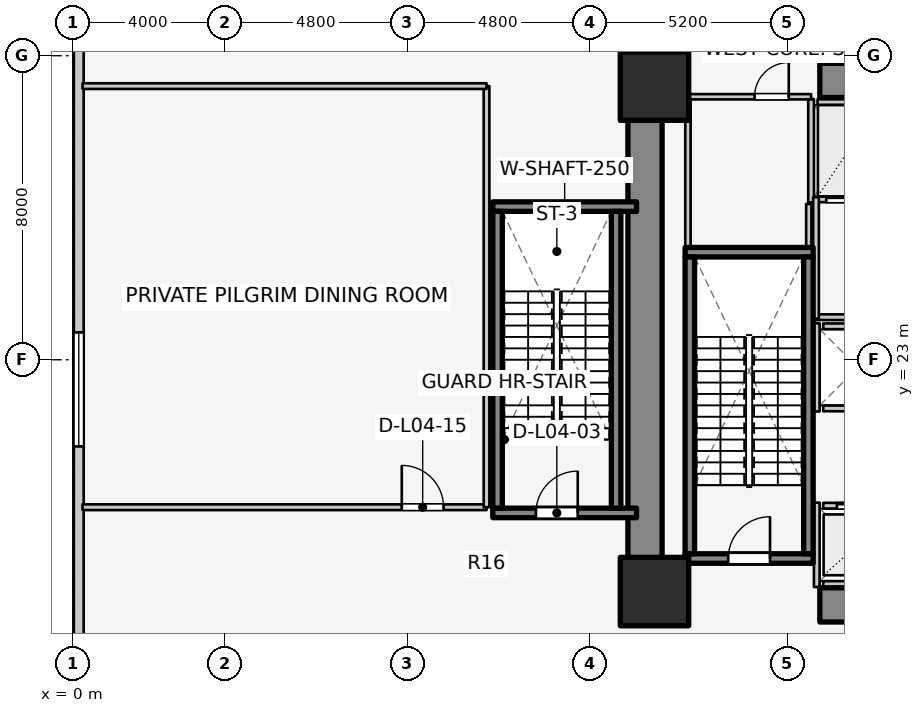
"""IFC4 building model, lengths in metres.
Left out: names, types, materials, properties, quantities, classifications, styles, units other than length and angle.
Written with IfcOpenShell. Run it as: python <this file> out.ifc"""

import sys

from ifc_helpers import new_model, si_unit, direction, frame, frame_2d, origin, origin_2d, place, context, subcontext, project, spatial, rectangle, extrude, element, fill, save


model = new_model("IFC4")
c1 = context("Model", 3, precision=1e-05, world=origin(), true_north=direction((0.0, 1.0)))
c2 = subcontext(c1, "Body", "Model", "MODEL_VIEW")
j1 = project(units=[si_unit("LENGTHUNIT", "METRE"), si_unit("PLANEANGLEUNIT", "RADIAN")], contexts=[c1])
p1 = place(None, origin())
s1 = spatial("IfcSite", under=j1, at=p1, CompositionType="ELEMENT")
p2 = place(p1, origin())
s2 = spatial("IfcBuilding", under=s1, at=p2, CompositionType="ELEMENT")
p3 = place(p2, frame((0.0, 0.0, 13.8)))
s3 = spatial("IfcBuildingStorey", under=s2, at=p3, CompositionType="ELEMENT", Elevation=13.8)
p4 = place(p3, frame((15.05, 17.05, 0.0), z_axis=(0.0, 0.0, 1.0), x_axis=(0.0, 1.0, 0.0)))
e1 = element("IfcWall", 1, at=p4, inside=s3, PredefinedType="SHEAR", context=c2, shape_type="SweptSolid", body=[
    extrude(rectangle(XDim=12.8, YDim=0.9, at=frame_2d((6.4, 0.0))), origin(), (0.0, 0.0, 1.0), 4.6),
])
for number, where, z_axis, x_axis in (
    (2, (19.65, 16.55, 0.0), (0.0, 0.0, 1.0), (1.0, 0.0, 0.0)),
    (3, (19.65, 30.35, 0.0), (0.0, 0.0, 1.0), (1.0, 0.0, 0.0)),
):
    element("IfcWall", number, at=place(p3, frame(where, z_axis=z_axis, x_axis=x_axis)), inside=s3, PredefinedType="SHEAR", context=c2, shape_type="SweptSolid", body=[
        extrude(rectangle(XDim=4.5, YDim=0.9, at=frame_2d((2.25, 0.0))), origin(), (0.0, 0.0, 1.0), 4.6),
    ])
p5 = place(p3, frame((16.105, 17.77, 0.0), z_axis=(0.0, 0.0, 1.0), x_axis=(1.0, 0.0, 0.0)))
e4 = element("IfcWall", 4, at=p5, inside=s3, PredefinedType="SOLIDWALL", context=c2, shape_type="SweptSolid", body=[
    extrude(rectangle(XDim=3.37, YDim=0.25, at=frame_2d((1.685, 0.0))), origin(), (0.0, 0.0, 1.0), 4.6),
])
p6 = place(p5, frame((1.135, 0.0, 0.0)))
e5 = element("IfcOpeningElement", 5, at=p6, cuts=e4, PredefinedType="OPENING", context=c2, shape_type="SweptSolid", body=[
    extrude(rectangle(XDim=1.1, YDim=2.1, at=frame_2d((0.55, 1.05))), frame((0.0, 0.135, 0.0), z_axis=(0.0, -1.0, 0.0), x_axis=(1.0, 0.0, 0.0)), (0.0, 0.0, 1.0), 0.27),
])
p7 = place(p3, frame((16.105, 25.83, 0.0), z_axis=(0.0, 0.0, 1.0), x_axis=(1.0, 0.0, 0.0)))
e6 = element("IfcWall", 6, at=p7, inside=s3, PredefinedType="SOLIDWALL", context=c2, shape_type="SweptSolid", body=[
    extrude(rectangle(XDim=3.37, YDim=0.25, at=frame_2d((1.685, 0.0))), origin(), (0.0, 0.0, 1.0), 4.6),
])
for number, where, z_axis, x_axis in (
    (7, (16.23, 17.895, 0.0), (0.0, 0.0, 1.0), (0.0, 1.0, 0.0)),
    (8, (19.35, 17.895, 0.0), (0.0, 0.0, 1.0), (0.0, 1.0, 0.0)),
):
    element("IfcWall", number, at=place(p3, frame(where, z_axis=z_axis, x_axis=x_axis)), inside=s3, PredefinedType="SOLIDWALL", context=c2, shape_type="SweptSolid", body=[
        extrude(rectangle(XDim=7.81, YDim=0.25, at=frame_2d((3.905, 0.0))), origin(), (0.0, 0.0, 1.0), 4.6),
    ])
p8 = place(p3, frame((11.045, 18.97, 0.0), z_axis=(0.0, 0.0, 1.0), x_axis=(1.0, 0.0, 0.0)))
e9 = element("IfcWall", 9, at=p8, inside=s3, PredefinedType="SOLIDWALL", context=c2, shape_type="SweptSolid", body=[
    extrude(rectangle(XDim=3.782, YDim=0.25, at=frame_2d((1.891, 0.0))), origin(), (0.0, 0.0, 1.0), 4.6),
])
p9 = place(p8, frame((1.135, 0.0, 0.0)))
e10 = element("IfcOpeningElement", 10, at=p9, cuts=e9, PredefinedType="OPENING", context=c2, shape_type="SweptSolid", body=[
    extrude(rectangle(XDim=1.1, YDim=2.1, at=frame_2d((0.55, 1.05))), frame((0.0, 0.135, 0.0), z_axis=(0.0, -1.0, 0.0), x_axis=(1.0, 0.0, 0.0)), (0.0, 0.0, 1.0), 0.27),
])
p10 = place(p3, frame((11.045, 27.03, 0.0), z_axis=(0.0, 0.0, 1.0), x_axis=(1.0, 0.0, 0.0)))
e11 = element("IfcWall", 11, at=p10, inside=s3, PredefinedType="SOLIDWALL", context=c2, shape_type="SweptSolid", body=[
    extrude(rectangle(XDim=3.782, YDim=0.25, at=frame_2d((1.891, 0.0))), origin(), (0.0, 0.0, 1.0), 4.6),
])
for number, where, z_axis, x_axis in (
    (12, (11.17, 19.095, 0.0), (0.0, 0.0, 1.0), (0.0, 1.0, 0.0)),
    (13, (14.29, 19.095, 0.0), (0.0, 0.0, 1.0), (0.0, 1.0, 0.0)),
):
    element("IfcWall", number, at=place(p3, frame(where, z_axis=z_axis, x_axis=x_axis)), inside=s3, PredefinedType="SOLIDWALL", context=c2, shape_type="SweptSolid", body=[
        extrude(rectangle(XDim=7.81, YDim=0.25, at=frame_2d((3.905, 0.0))), origin(), (0.0, 0.0, 1.0), 4.6),
    ])
for number, where, z_axis, x_axis in (
    (14, (15.3, 16.9, 0.0), (0.0, 0.0, 1.0), (1.0, 0.0, 0.0)),
    (15, (15.3, 30.2, 0.0), (0.0, 0.0, 1.0), (1.0, 0.0, 0.0)),
):
    element("IfcColumn", number, at=place(p3, frame(where, z_axis=z_axis, x_axis=x_axis)), inside=s3, PredefinedType="COLUMN", context=c2, shape_type="SweptSolid", body=[
        extrude(rectangle(XDim=1.8, YDim=1.8, at=origin_2d()), origin(), (0.0, 0.0, 1.0), 4.6),
    ])
p11 = place(p3, frame((0.15, 45.72, 0.0), z_axis=(0.0, 0.0, 1.0), x_axis=(0.0, -1.0, 0.0)))
e16 = element("IfcWall", 16, at=p11, inside=s3, PredefinedType="STANDARD", context=c2, shape_type="SweptSolid", body=[
    extrude(rectangle(XDim=45.44, YDim=0.26, at=frame_2d((22.72, 0.0))), origin(), (0.0, 0.0, 1.0), 4.28),
])
p12 = place(p11, frame((6.0, 0.0, 0.9)))
e17 = element("IfcOpeningElement", 17, at=p12, cuts=e16, PredefinedType="OPENING", context=c2, shape_type="SweptSolid", body=[
    extrude(rectangle(XDim=3.0, YDim=2.4, at=frame_2d((1.5, 1.2))), frame((0.0, 0.14, 0.0), z_axis=(0.0, -1.0, 0.0), x_axis=(1.0, 0.0, 0.0)), (0.0, 0.0, 1.0), 0.28),
])
p13 = place(p11, frame((22.0, 0.0, 0.9)))
e18 = element("IfcOpeningElement", 18, at=p13, cuts=e16, PredefinedType="OPENING", context=c2, shape_type="SweptSolid", body=[
    extrude(rectangle(XDim=3.0, YDim=2.4, at=frame_2d((1.5, 1.2))), frame((0.0, 0.14, 0.0), z_axis=(0.0, -1.0, 0.0), x_axis=(1.0, 0.0, 0.0)), (0.0, 0.0, 1.0), 0.28),
])
p14 = place(p11, frame((38.0, 0.0, 0.9)))
e19 = element("IfcOpeningElement", 19, at=p14, cuts=e16, PredefinedType="OPENING", context=c2, shape_type="SweptSolid", body=[
    extrude(rectangle(XDim=3.0, YDim=2.4, at=frame_2d((1.5, 1.2))), frame((0.0, 0.14, 0.0), z_axis=(0.0, -1.0, 0.0), x_axis=(1.0, 0.0, 0.0)), (0.0, 0.0, 1.0), 0.28),
])
p15 = place(p3, frame((19.74, 19.16, 0.0), z_axis=(0.0, 0.0, 1.0), x_axis=(1.0, 0.0, 0.0)))
e20 = element("IfcWall", 20, at=p15, inside=s3, PredefinedType="SOLIDWALL", context=c2, shape_type="SweptSolid", body=[
    extrude(rectangle(XDim=1.82, YDim=0.15, at=frame_2d((0.91, 0.0))), origin(), (0.0, 0.0, 1.0), 4.255),
])
p16 = place(p15, frame((0.36, 0.0, 0.0)))
e21 = element("IfcOpeningElement", 21, at=p16, cuts=e20, PredefinedType="OPENING", context=c2, shape_type="SweptSolid", body=[
    extrude(rectangle(XDim=1.1, YDim=2.1, at=frame_2d((0.55, 1.05))), frame((0.0, 0.085, 0.0), z_axis=(0.0, -1.0, 0.0), x_axis=(1.0, 0.0, 0.0)), (0.0, 0.0, 1.0), 0.17),
])
p17 = place(p3, frame((19.74, 17.1, 0.0), z_axis=(0.0, 0.0, 1.0), x_axis=(1.0, 0.0, 0.0)))
e22 = element("IfcWall", 22, at=p17, inside=s3, PredefinedType="SOLIDWALL", context=c2, shape_type="SweptSolid", body=[
    extrude(rectangle(XDim=1.82, YDim=0.15, at=frame_2d((0.91, 0.0))), origin(), (0.0, 0.0, 1.0), 4.255),
])
p18 = place(p3, frame((19.57, 17.02, 0.0), z_axis=(0.0, 0.0, 1.0), x_axis=(0.0, 1.0, 0.0)))
e23 = element("IfcWall", 23, at=p18, inside=s3, PredefinedType="SOLIDWALL", context=c2, shape_type="SweptSolid", body=[
    extrude(rectangle(XDim=2.22, YDim=0.15, at=frame_2d((1.11, 0.0))), origin(), (0.0, 0.0, 1.0), 3.62),
])
for number, where, z_axis, x_axis in (
    (24, (19.74, 21.72, 0.0), (0.0, 0.0, 1.0), (1.0, 0.0, 0.0)),
    (25, (19.74, 23.88, 0.0), (0.0, 0.0, 1.0), (1.0, 0.0, 0.0)),
):
    element("IfcWall", number, at=place(p3, frame(where, z_axis=z_axis, x_axis=x_axis)), inside=s3, PredefinedType="SOLIDWALL", context=c2, shape_type="SweptSolid", body=[
        extrude(rectangle(XDim=1.82, YDim=0.15, at=frame_2d((0.91, 0.0))), origin(), (0.0, 0.0, 1.0), 4.255),
    ])
p19 = place(p3, frame((19.57, 21.64, 0.0), z_axis=(0.0, 0.0, 1.0), x_axis=(0.0, 1.0, 0.0)))
e26 = element("IfcWall", 26, at=p19, inside=s3, PredefinedType="SOLIDWALL", context=c2, shape_type="SweptSolid", body=[
    extrude(rectangle(XDim=2.32, YDim=0.15, at=frame_2d((1.16, 0.0))), origin(), (0.0, 0.0, 1.0), 4.255),
])
p20 = place(p3, frame((19.59, 27.22, 0.0), z_axis=(0.0, 0.0, 1.0), x_axis=(1.0, 0.0, 0.0)))
e27 = element("IfcWall", 27, at=p20, inside=s3, PredefinedType="SOLIDWALL", context=c2, shape_type="SweptSolid", body=[
    extrude(rectangle(XDim=1.76, YDim=0.15, at=frame_2d((0.88, 0.0))), origin(), (0.0, 0.0, 1.0), 4.255),
])
p21 = place(p20, frame((0.23, 0.0, 0.0)))
e28 = element("IfcOpeningElement", 28, at=p21, cuts=e27, PredefinedType="OPENING", context=c2, shape_type="SweptSolid", body=[
    extrude(rectangle(XDim=1.3, YDim=2.1, at=frame_2d((0.65, 1.05))), frame((0.0, 0.085, 0.0), z_axis=(0.0, -1.0, 0.0), x_axis=(1.0, 0.0, 0.0)), (0.0, 0.0, 1.0), 0.17),
])
p22 = place(p3, frame((19.59, 29.78, 0.0), z_axis=(0.0, 0.0, 1.0), x_axis=(1.0, 0.0, 0.0)))
e29 = element("IfcWall", 29, at=p22, inside=s3, PredefinedType="SOLIDWALL", context=c2, shape_type="SweptSolid", body=[
    extrude(rectangle(XDim=1.76, YDim=0.15, at=frame_2d((0.88, 0.0))), origin(), (0.0, 0.0, 1.0), 4.255),
])
p23 = place(p3, frame((19.42, 27.14, 0.0), z_axis=(0.0, 0.0, 1.0), x_axis=(0.0, 1.0, 0.0)))
e30 = element("IfcWall", 30, at=p23, inside=s3, PredefinedType="SOLIDWALL", context=c2, shape_type="SweptSolid", body=[
    extrude(rectangle(XDim=2.72, YDim=0.15, at=frame_2d((1.36, 0.0))), origin(), (0.0, 0.0, 1.0), 4.255),
])
p24 = place(p3, frame((19.52, 24.12, 0.0), z_axis=(0.0, 0.0, 1.0), x_axis=(1.0, 0.0, 0.0)))
e31 = element("IfcWall", 31, at=p24, inside=s3, PredefinedType="PARTITIONING", context=c2, shape_type="SweptSolid", body=[
    extrude(rectangle(XDim=5.08, YDim=0.15, at=frame_2d((2.54, 0.0))), origin(), (0.0, 0.0, 1.0), 3.62),
])
p25 = place(p3, frame((19.55, 24.08, 0.0), z_axis=(0.0, 0.0, 1.0), x_axis=(0.0, 1.0, 0.0)))
e32 = element("IfcWall", 32, at=p25, inside=s3, PredefinedType="PARTITIONING", context=c2, shape_type="SweptSolid", body=[
    extrude(rectangle(XDim=3.2, YDim=0.15, at=frame_2d((1.6, 0.0))), origin(), (0.0, 0.0, 1.0), 4.255),
])
p26 = place(p3, frame((0.25, 19.12, 0.0), z_axis=(0.0, 0.0, 1.0), x_axis=(1.0, 0.0, 0.0)))
e33 = element("IfcWall", 33, at=p26, inside=s3, PredefinedType="PARTITIONING", context=c2, shape_type="SweptSolid", body=[
    extrude(rectangle(XDim=10.63, YDim=0.15, at=frame_2d((5.315, 0.0))), origin(), (0.0, 0.0, 1.0), 3.3),
])
p27 = place(p26, frame((8.4, 0.0, 0.0)))
e34 = element("IfcOpeningElement", 34, at=p27, cuts=e33, PredefinedType="OPENING", context=c2, shape_type="SweptSolid", body=[
    extrude(rectangle(XDim=1.1, YDim=2.1, at=frame_2d((0.55, 1.05))), frame((0.0, 0.085, 0.0), z_axis=(0.0, -1.0, 0.0), x_axis=(1.0, 0.0, 0.0)), (0.0, 0.0, 1.0), 0.17),
])
p28 = place(p3, frame((10.88, 19.12, 0.0), z_axis=(0.0, 0.0, 1.0), x_axis=(0.0, 1.0, 0.0)))
e35 = element("IfcWall", 35, at=p28, inside=s3, PredefinedType="PARTITIONING", context=c2, shape_type="SweptSolid", body=[
    extrude(rectangle(XDim=11.08, YDim=0.15, at=frame_2d((5.54, 0.0))), origin(), (0.0, 0.0, 1.0), 3.62),
])
p29 = place(p3, frame((0.25, 30.2, 0.0), z_axis=(0.0, 0.0, 1.0), x_axis=(1.0, 0.0, 0.0)))
e36 = element("IfcWall", 36, at=p29, inside=s3, PredefinedType="PARTITIONING", context=c2, shape_type="SweptSolid", body=[
    extrude(rectangle(XDim=10.63, YDim=0.15, at=frame_2d((5.315, 0.0))), origin(), (0.0, 0.0, 1.0), 3.3),
])
p30 = place(p3, frame((16.12, 29.92, 0.0), z_axis=(0.0, 0.0, 1.0), x_axis=(1.0, 0.0, 0.0)))
e37 = element("IfcWall", 37, at=p30, inside=s3, PredefinedType="PLUMBINGWALL", context=c2, shape_type="SweptSolid", body=[
    extrude(rectangle(XDim=3.3, YDim=0.14, at=frame_2d((1.65, 0.0))), origin(), (0.0, 0.0, 1.0), 4.255),
])
p31 = place(p30, frame((1.813, 0.0, 0.0)))
e38 = element("IfcOpeningElement", 38, at=p31, cuts=e37, PredefinedType="OPENING", context=c2, shape_type="SweptSolid", body=[
    extrude(rectangle(XDim=0.9, YDim=2.1, at=frame_2d((0.45, 1.05))), frame((0.0, 0.08, 0.0), z_axis=(0.0, -1.0, 0.0), x_axis=(1.0, 0.0, 0.0)), (0.0, 0.0, 1.0), 0.16),
])
p32 = place(p3, frame((16.18, 25.98, 0.0), z_axis=(0.0, 0.0, 1.0), x_axis=(0.0, 1.0, 0.0)))
e39 = element("IfcWall", 39, at=p32, inside=s3, PredefinedType="PLUMBINGWALL", context=c2, shape_type="SweptSolid", body=[
    extrude(rectangle(XDim=3.88, YDim=0.14, at=frame_2d((1.94, 0.0))), origin(), (0.0, 0.0, 1.0), 4.255),
])
p33 = place(p3, frame((19.36, 25.98, 0.0), z_axis=(0.0, 0.0, 1.0), x_axis=(0.0, 1.0, 0.0)))
e40 = element("IfcWall", 40, at=p33, inside=s3, PredefinedType="PLUMBINGWALL", context=c2, shape_type="SweptSolid", body=[
    extrude(rectangle(XDim=1.12, YDim=0.14, at=frame_2d((0.56, 0.0))), origin(), (0.0, 0.0, 1.0), 4.255),
])
p34 = place(p13, origin())
e41 = element("IfcWindow", 41, at=p34, inside=s3, PartitioningType="SINGLE_PANEL", PredefinedType="WINDOW", context=c2, shape_type="SweptSolid", body=[
    extrude(rectangle(XDim=3.0, YDim=2.4, at=frame_2d((1.5, 1.2))), frame((0.0, 0.03, 0.0), z_axis=(0.0, -1.0, 0.0), x_axis=(1.0, 0.0, 0.0)), (0.0, 0.0, 1.0), 0.06),
])
fill(e18, e41)
p35 = place(p6, origin())
e42 = element("IfcDoor", 42, at=p35, inside=s3, OperationType="SINGLE_SWING_RIGHT", PredefinedType="DOOR", context=c2, shape_type="SweptSolid", body=[
    extrude(rectangle(XDim=1.1, YDim=2.1, at=frame_2d((0.55, 1.05))), frame((0.0, 0.025, 0.0), z_axis=(0.0, -1.0, 0.0), x_axis=(1.0, 0.0, 0.0)), (0.0, 0.0, 1.0), 0.05),
])
fill(e5, e42)
p36 = place(p9, origin())
e43 = element("IfcDoor", 43, at=p36, inside=s3, OperationType="SINGLE_SWING_RIGHT", PredefinedType="DOOR", context=c2, shape_type="SweptSolid", body=[
    extrude(rectangle(XDim=1.1, YDim=2.1, at=frame_2d((0.55, 1.05))), frame((0.0, 0.025, 0.0), z_axis=(0.0, -1.0, 0.0), x_axis=(1.0, 0.0, 0.0)), (0.0, 0.0, 1.0), 0.05),
])
fill(e10, e43)
p37 = place(p16, origin())
e44 = element("IfcDoor", 44, at=p37, inside=s3, OperationType="DOUBLE_DOOR_SLIDING", PredefinedType="DOOR", context=c2, shape_type="SweptSolid", body=[
    extrude(rectangle(XDim=1.1, YDim=2.1, at=frame_2d((0.55, 1.05))), frame((0.0, 0.025, 0.0), z_axis=(0.0, -1.0, 0.0), x_axis=(1.0, 0.0, 0.0)), (0.0, 0.0, 1.0), 0.05),
])
fill(e21, e44)
p38 = place(p21, origin())
e45 = element("IfcDoor", 45, at=p38, inside=s3, OperationType="DOUBLE_DOOR_SLIDING", PredefinedType="DOOR", context=c2, shape_type="SweptSolid", body=[
    extrude(rectangle(XDim=1.3, YDim=2.1, at=frame_2d((0.65, 1.05))), frame((0.0, 0.025, 0.0), z_axis=(0.0, -1.0, 0.0), x_axis=(1.0, 0.0, 0.0)), (0.0, 0.0, 1.0), 0.05),
])
fill(e28, e45)
p39 = place(p27, origin())
e46 = element("IfcDoor", 46, at=p39, inside=s3, OperationType="SINGLE_SWING_LEFT", PredefinedType="DOOR", context=c2, shape_type="SweptSolid", body=[
    extrude(rectangle(XDim=1.1, YDim=2.1, at=frame_2d((0.55, 1.05))), frame((0.0, 0.025, 0.0), z_axis=(0.0, -1.0, 0.0), x_axis=(1.0, 0.0, 0.0)), (0.0, 0.0, 1.0), 0.05),
])
fill(e34, e46)
p40 = place(p31, origin())
e47 = element("IfcDoor", 47, at=p40, inside=s3, OperationType="SINGLE_SWING_RIGHT", PredefinedType="DOOR", context=c2, shape_type="SweptSolid", body=[
    extrude(rectangle(XDim=0.9, YDim=2.1, at=frame_2d((0.45, 1.05))), frame((0.0, 0.025, 0.0), z_axis=(0.0, -1.0, 0.0), x_axis=(1.0, 0.0, 0.0)), (0.0, 0.0, 1.0), 0.05),
])
fill(e38, e47)
save(model, sys.argv[1])
